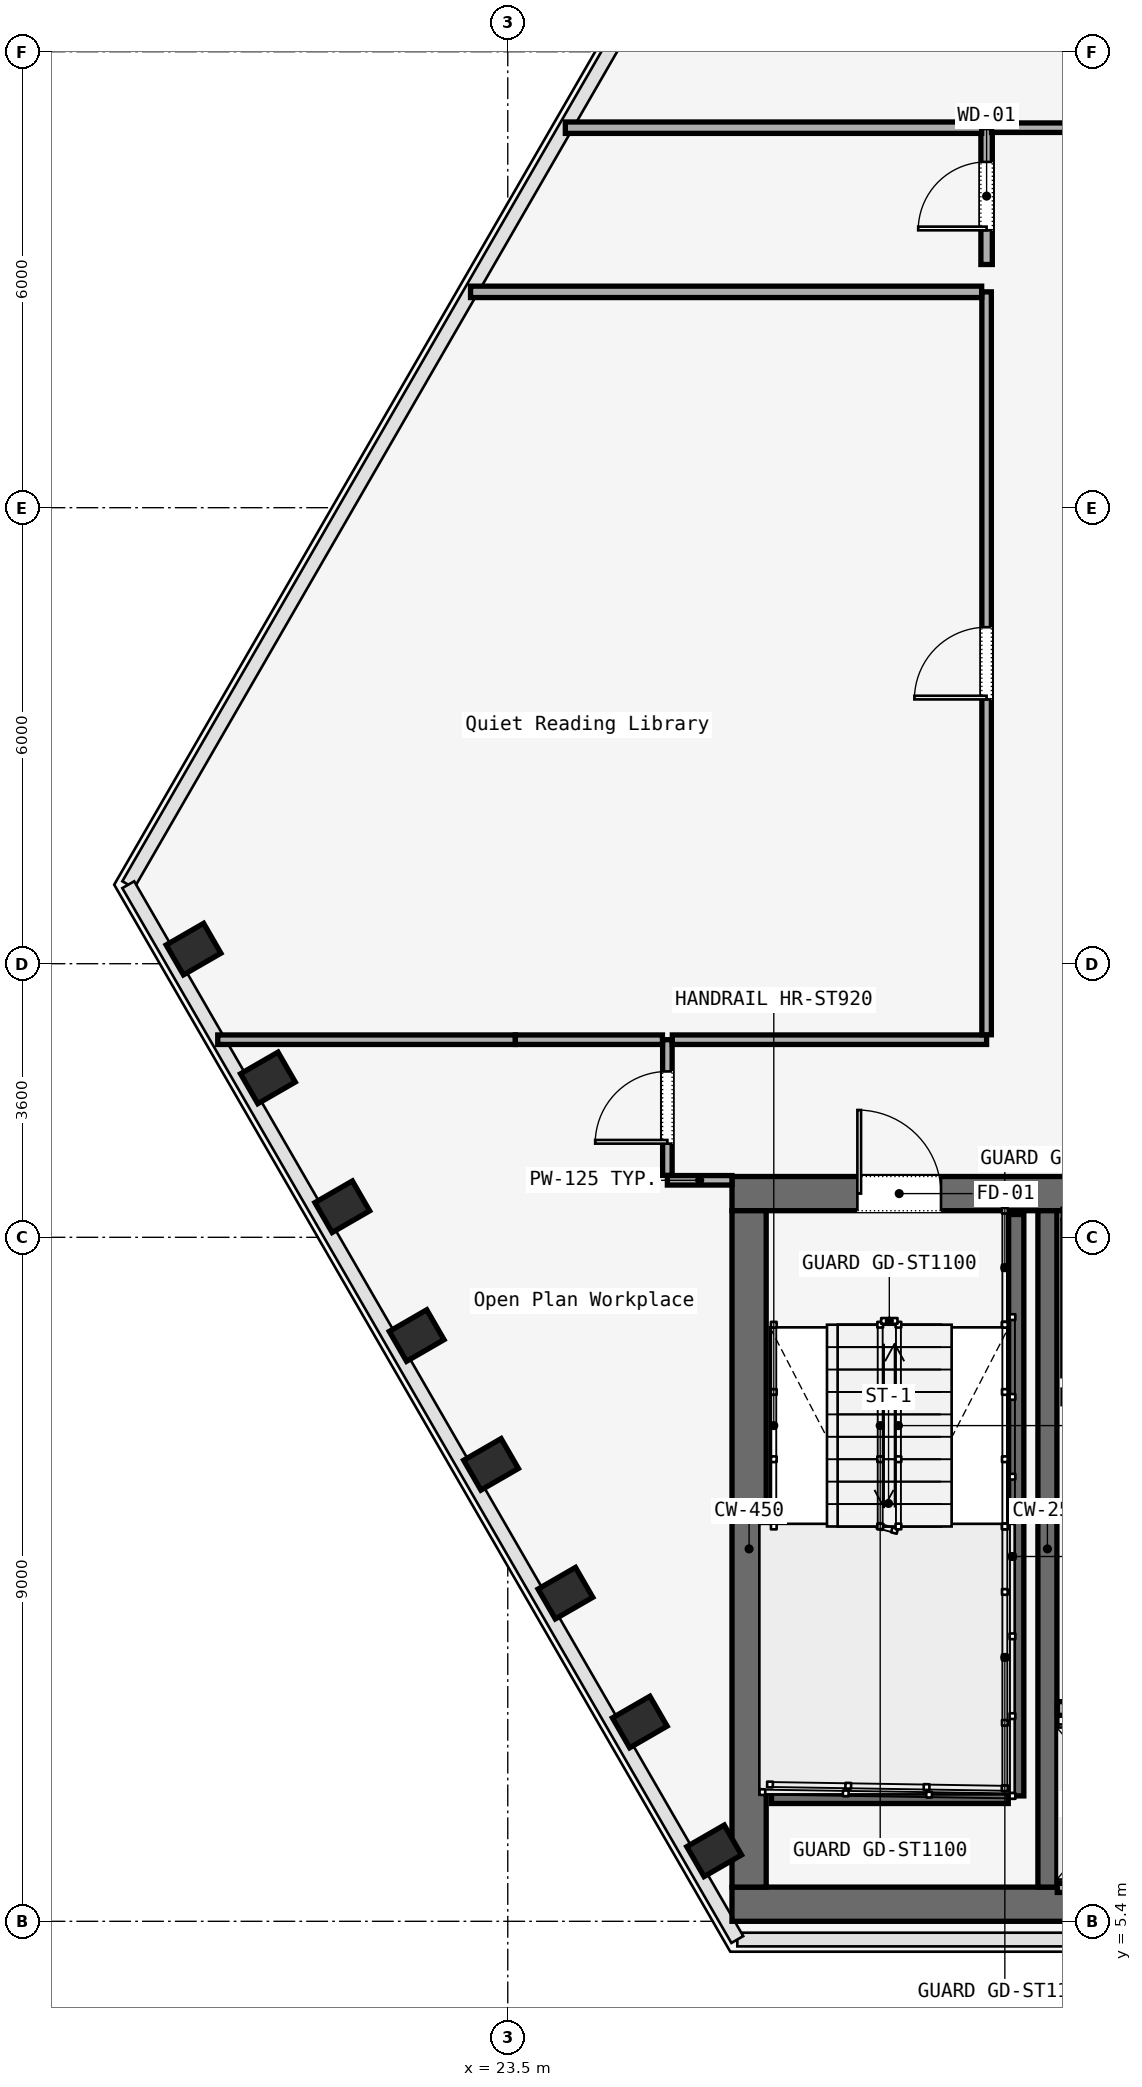
"""IFC4 building model, lengths in metres.
Left out: names, types, materials, properties, quantities, classifications, styles, units other than length and angle.
Written with IfcOpenShell. Run it as: python <this file> out.ifc"""

import sys

from ifc_helpers import new_model, si_unit, direction, frame, frame_2d, origin, origin_2d, place, context, subcontext, project, spatial, rectangle, i_section, extrude, element, fill, save


model = new_model("IFC4")
c1 = context("Model", 3, precision=1e-05, world=origin(), true_north=direction((0.0, 1.0)))
c2 = subcontext(c1, "Body", "Model", "MODEL_VIEW")
j1 = project(units=[si_unit("LENGTHUNIT", "METRE"), si_unit("PLANEANGLEUNIT", "RADIAN")], contexts=[c1])
p1 = place(None, origin())
s1 = spatial("IfcSite", under=j1, at=p1, CompositionType="ELEMENT")
p2 = place(p1, origin())
s2 = spatial("IfcBuilding", under=s1, at=p2, CompositionType="ELEMENT")
p3 = place(p2, frame((0.0, 0.0, 51.2)))
s3 = spatial("IfcBuildingStorey", under=s2, at=p3, CompositionType="ELEMENT", Elevation=51.2)
p4 = place(p3, frame((26.45, 14.975, 0.0), z_axis=(0.0, 0.0, 1.0), x_axis=(1.0, 0.0, 0.0)))
e1 = element("IfcWall", 1, at=p4, inside=s3, PredefinedType="SOLIDWALL", context=c2, shape_type="SweptSolid", body=[
    extrude(rectangle(XDim=31.1, YDim=0.45, at=frame_2d((15.55, 0.0))), origin(), (0.0, 0.0, 1.0), 3.58),
])
p5 = place(p4, frame((1.65, 0.0, 0.0)))
e2 = element("IfcOpeningElement", 2, at=p5, cuts=e1, PredefinedType="OPENING", context=c2, shape_type="SweptSolid", body=[
    extrude(rectangle(XDim=1.1, YDim=2.2, at=frame_2d((0.55, 1.1))), frame((0.0, 0.225, 0.0), z_axis=(0.0, -1.0, 0.0), x_axis=(1.0, 0.0, 0.0)), (0.0, 0.0, 1.0), 0.45),
])
p6 = place(p4, frame((13.65, 0.0, 0.0)))
e3 = element("IfcOpeningElement", 3, at=p6, cuts=e1, PredefinedType="OPENING", context=c2, shape_type="SweptSolid", body=[
    extrude(rectangle(XDim=1.1, YDim=2.2, at=frame_2d((0.55, 1.1))), frame((0.0, 0.225, 0.0), z_axis=(0.0, -1.0, 0.0), x_axis=(1.0, 0.0, 0.0)), (0.0, 0.0, 1.0), 0.45),
])
p7 = place(p4, frame((25.55, 0.0, 0.0)))
e4 = element("IfcOpeningElement", 4, at=p7, cuts=e1, PredefinedType="OPENING", context=c2, shape_type="SweptSolid", body=[
    extrude(rectangle(XDim=1.1, YDim=2.2, at=frame_2d((0.55, 1.1))), frame((0.0, 0.225, 0.0), z_axis=(0.0, -1.0, 0.0), x_axis=(1.0, 0.0, 0.0)), (0.0, 0.0, 1.0), 0.45),
])
p8 = place(p4, frame((10.7, 0.0, 0.0)))
e5 = element("IfcOpeningElement", 5, at=p8, cuts=e1, PredefinedType="OPENING", context=c2, shape_type="SweptSolid", body=[
    extrude(rectangle(XDim=1.4, YDim=2.2, at=frame_2d((0.7, 1.1))), frame((0.0, 0.225, 0.0), z_axis=(0.0, -1.0, 0.0), x_axis=(1.0, 0.0, 0.0)), (0.0, 0.0, 1.0), 0.45),
])
p9 = place(p4, frame((19.35, 0.0, 0.0)))
e6 = element("IfcOpeningElement", 6, at=p9, cuts=e1, PredefinedType="OPENING", context=c2, shape_type="SweptSolid", body=[
    extrude(rectangle(XDim=1.1, YDim=2.2, at=frame_2d((0.55, 1.1))), frame((0.0, 0.225, 0.0), z_axis=(0.0, -1.0, 0.0), x_axis=(1.0, 0.0, 0.0)), (0.0, 0.0, 1.0), 0.45),
])
p10 = place(p4, frame((21.4, 0.0, 0.0)))
e7 = element("IfcOpeningElement", 7, at=p10, cuts=e1, PredefinedType="OPENING", context=c2, shape_type="SweptSolid", body=[
    extrude(rectangle(XDim=0.9, YDim=2.1, at=frame_2d((0.45, 1.05))), frame((0.0, 0.225, 0.0), z_axis=(0.0, -1.0, 0.0), x_axis=(1.0, 0.0, 0.0)), (0.0, 0.0, 1.0), 0.45),
])
p11 = place(p4, frame((23.35, 0.0, 0.0)))
e8 = element("IfcOpeningElement", 8, at=p11, cuts=e1, PredefinedType="OPENING", context=c2, shape_type="SweptSolid", body=[
    extrude(rectangle(XDim=1.3, YDim=2.3, at=frame_2d((0.65, 1.15))), frame((0.0, 0.225, 0.0), z_axis=(0.0, -1.0, 0.0), x_axis=(1.0, 0.0, 0.0)), (0.0, 0.0, 1.0), 0.45),
])
p12 = place(p3, frame((26.45, 5.625, 0.0), z_axis=(0.0, 0.0, 1.0), x_axis=(1.0, 0.0, 0.0)))
e9 = element("IfcWall", 9, at=p12, inside=s3, PredefinedType="SOLIDWALL", context=c2, shape_type="SweptSolid", body=[
    extrude(rectangle(XDim=31.1, YDim=0.45, at=frame_2d((15.55, 0.0))), origin(), (0.0, 0.0, 1.0), 3.58),
])
p13 = place(p3, frame((26.675, 5.85, 0.0), z_axis=(0.0, 0.0, 1.0), x_axis=(0.0, 1.0, 0.0)))
e10 = element("IfcWall", 10, at=p13, inside=s3, PredefinedType="SOLIDWALL", context=c2, shape_type="SweptSolid", body=[
    extrude(rectangle(XDim=8.9, YDim=0.45, at=frame_2d((4.45, 0.0))), origin(), (0.0, 0.0, 1.0), 3.58),
])
p14 = place(p3, frame((30.6, 5.85, 0.0), z_axis=(0.0, 0.0, 1.0), x_axis=(0.0, 1.0, 0.0)))
e11 = element("IfcWall", 11, at=p14, inside=s3, PredefinedType="SOLIDWALL", context=c2, shape_type="SweptSolid", body=[
    extrude(rectangle(XDim=8.9, YDim=0.25, at=frame_2d((4.45, 0.0))), origin(), (0.0, 0.0, 1.0), 3.58),
])
for number, where, z_axis, x_axis in (
    (12, (19.365, 18.192, 0.0), (0.0, 0.0, 1.0), (-0.5, 0.866, 0.0)),
    (13, (20.344, 16.497, 0.0), (0.0, 0.0, 1.0), (-0.5, 0.866, 0.0)),
    (14, (21.323, 14.802, 0.0), (0.0, 0.0, 1.0), (-0.5, 0.866, 0.0)),
    (15, (22.301, 13.107, 0.0), (0.0, 0.0, 1.0), (-0.5, 0.866, 0.0)),
    (16, (23.28, 11.412, 0.0), (0.0, 0.0, 1.0), (-0.5, 0.866, 0.0)),
    (17, (24.258, 9.717, 0.0), (0.0, 0.0, 1.0), (-0.5, 0.866, 0.0)),
    (18, (25.237, 8.022, 0.0), (0.0, 0.0, 1.0), (-0.5, 0.866, 0.0)),
    (19, (26.216, 6.327, 0.0), (0.0, 0.0, 1.0), (-0.5, 0.866, 0.0)),
):
    element("IfcColumn", number, at=place(p3, frame(where, z_axis=z_axis, x_axis=x_axis)), inside=s3, PredefinedType="COLUMN", context=c2, shape_type="SweptSolid", body=[
        extrude(i_section(OverallWidth=0.454, OverallDepth=0.569, WebThickness=0.078, FlangeThickness=0.08, FilletRadius=0.015, at=origin_2d()), origin(), (0.0, 0.0, 1.0), 3.58),
    ])
p15 = place(p3, frame((30.19, 14.7, 0.0), z_axis=(0.0, 0.0, 1.0), x_axis=(0.0, -1.0, 0.0)))
e20 = element("IfcWall", 20, at=p15, inside=s3, PredefinedType="SOLIDWALL", context=c2, shape_type="SweptSolid", body=[
    extrude(rectangle(XDim=7.65, YDim=0.2, at=frame_2d((3.825, 0.0))), origin(), (0.0, 0.0, 1.0), 3.8),
])
p16 = place(p3, frame((26.97, 7.05, 0.0), z_axis=(0.0, 0.0, 1.0), x_axis=(1.0, 0.0, 0.0)))
e21 = element("IfcWall", 21, at=p16, inside=s3, PredefinedType="SOLIDWALL", context=c2, shape_type="SweptSolid", body=[
    extrude(rectangle(XDim=3.115, YDim=0.2, at=frame_2d((1.558, 0.0))), origin(), (0.0, 0.0, 1.0), 3.8),
])
p17 = place(p3, frame((30.73, 8.2, 0.0), z_axis=(0.0, 0.0, 1.0), x_axis=(1.0, 0.0, 0.0)))
e22 = element("IfcWall", 22, at=p17, inside=s3, PredefinedType="SOLIDWALL", context=c2, shape_type="SweptSolid", body=[
    extrude(rectangle(XDim=1.665, YDim=0.18, at=frame_2d((0.833, 0.0))), origin(), (0.0, 0.0, 1.0), 2.933),
])
p18 = place(p17, frame((0.282, 0.0, 0.0)))
e23 = element("IfcOpeningElement", 23, at=p18, cuts=e22, PredefinedType="OPENING", context=c2, shape_type="SweptSolid", body=[
    extrude(rectangle(XDim=1.1, YDim=2.2, at=frame_2d((0.55, 1.1))), frame((0.0, 0.09, 0.0), z_axis=(0.0, -1.0, 0.0), x_axis=(1.0, 0.0, 0.0)), (0.0, 0.0, 1.0), 0.18),
])
p19 = place(p3, frame((30.73, 5.84, 0.0), z_axis=(0.0, 0.0, 1.0), x_axis=(1.0, 0.0, 0.0)))
e24 = element("IfcWall", 24, at=p19, inside=s3, PredefinedType="SOLIDWALL", context=c2, shape_type="SweptSolid", body=[
    extrude(rectangle(XDim=1.665, YDim=0.12, at=frame_2d((0.833, 0.0))), origin(), (0.0, 0.0, 1.0), 2.933),
])
p20 = place(p3, frame((26.45, 15.15, 0.0), z_axis=(0.0, 0.0, 1.0), x_axis=(-1.0, 0.0, 0.0)))
e25 = element("IfcWall", 25, at=p20, inside=s3, PredefinedType="PARTITIONING", context=c2, shape_type="SweptSolid", body=[
    extrude(rectangle(XDim=0.85, YDim=0.125, at=frame_2d((0.425, 0.0))), origin(), (0.0, 0.0, 1.0), 2.933),
])
p21 = place(p3, frame((25.6, 15.215, 0.0), z_axis=(0.0, 0.0, 1.0), x_axis=(0.0, 1.0, 0.0)))
e26 = element("IfcWall", 26, at=p21, inside=s3, PredefinedType="PARTITIONING", context=c2, shape_type="SweptSolid", body=[
    extrude(rectangle(XDim=1.785, YDim=0.125, at=frame_2d((0.893, 0.0))), origin(), (0.0, 0.0, 1.0), 2.933),
])
p22 = place(p21, frame((0.417, 0.0, 0.0)))
e27 = element("IfcOpeningElement", 27, at=p22, cuts=e26, PredefinedType="OPENING", context=c2, shape_type="SweptSolid", body=[
    extrude(rectangle(XDim=0.95, YDim=2.2, at=frame_2d((0.475, 1.1))), frame((0.0, 0.062, 0.0), z_axis=(0.0, -1.0, 0.0), x_axis=(1.0, 0.0, 0.0)), (0.0, 0.0, 1.0), 0.125),
])
p23 = place(p3, frame((25.665, 17.0, 0.0), z_axis=(0.0, 0.0, 1.0), x_axis=(1.0, 0.0, 0.0)))
e28 = element("IfcWall", 28, at=p23, inside=s3, PredefinedType="PARTITIONING", context=c2, shape_type="SweptSolid", body=[
    extrude(rectangle(XDim=4.135, YDim=0.125, at=frame_2d((2.067, 0.0))), origin(), (0.0, 0.0, 1.0), 2.933),
])
p24 = place(p3, frame((29.8, 17.065, 0.0), z_axis=(0.0, 0.0, 1.0), x_axis=(0.0, 1.0, 0.0)))
e29 = element("IfcWall", 29, at=p24, inside=s3, PredefinedType="PARTITIONING", context=c2, shape_type="SweptSolid", body=[
    extrude(rectangle(XDim=9.775, YDim=0.125, at=frame_2d((4.888, 0.0))), origin(), (0.0, 0.0, 1.0), 2.933),
])
p25 = place(p24, frame((4.413, 0.0, 0.0)))
e30 = element("IfcOpeningElement", 30, at=p25, cuts=e29, PredefinedType="OPENING", context=c2, shape_type="SweptSolid", body=[
    extrude(rectangle(XDim=0.95, YDim=2.2, at=frame_2d((0.475, 1.1))), frame((0.0, 0.062, 0.0), z_axis=(0.0, -1.0, 0.0), x_axis=(1.0, 0.0, 0.0)), (0.0, 0.0, 1.0), 0.125),
])
p26 = place(p3, frame((29.8, 27.2, 0.0), z_axis=(0.0, 0.0, 1.0), x_axis=(0.0, 1.0, 0.0)))
e31 = element("IfcWall", 31, at=p26, inside=s3, PredefinedType="PARTITIONING", context=c2, shape_type="SweptSolid", body=[
    extrude(rectangle(XDim=1.8, YDim=0.15, at=frame_2d((0.9, 0.0))), origin(), (0.0, 0.0, 1.0), 2.933),
])
p27 = place(p26, frame((0.45, 0.0, 0.0)))
e32 = element("IfcOpeningElement", 32, at=p27, cuts=e31, PredefinedType="OPENING", context=c2, shape_type="SweptSolid", body=[
    extrude(rectangle(XDim=0.9, YDim=2.15, at=frame_2d((0.45, 1.075))), frame((0.0, 0.075, 0.0), z_axis=(0.0, -1.0, 0.0), x_axis=(1.0, 0.0, 0.0)), (0.0, 0.0, 1.0), 0.15),
])
p28 = place(p3, frame((29.865, 29.0, 0.0), z_axis=(0.0, 0.0, 1.0), x_axis=(1.0, 0.0, 0.0)))
e33 = element("IfcWall", 33, at=p28, inside=s3, PredefinedType="PARTITIONING", context=c2, shape_type="SweptSolid", body=[
    extrude(rectangle(XDim=1.735, YDim=0.125, at=frame_2d((0.868, 0.0))), origin(), (0.0, 0.0, 1.0), 2.933),
])
p29 = place(p3, frame((19.684, 17.0, 0.0), z_axis=(0.0, 0.0, 1.0), x_axis=(1.0, 0.0, 0.0)))
e34 = element("IfcWall", 34, at=p29, inside=s3, PredefinedType="PARTITIONING", context=c2, shape_type="SweptSolid", body=[
    extrude(rectangle(XDim=3.916, YDim=0.125, at=frame_2d((1.958, 0.0))), origin(), (0.0, 0.0, 1.0), 2.933),
])
p30 = place(p3, frame((23.6, 17.0, 0.0), z_axis=(0.0, 0.0, 1.0), x_axis=(1.0, 0.0, 0.0)))
e35 = element("IfcWall", 35, at=p30, inside=s3, PredefinedType="PARTITIONING", context=c2, shape_type="SweptSolid", body=[
    extrude(rectangle(XDim=1.935, YDim=0.125, at=frame_2d((0.967, 0.0))), origin(), (0.0, 0.0, 1.0), 2.933),
])
p31 = place(p3, frame((23.01, 26.84, 0.0), z_axis=(0.0, 0.0, 1.0), x_axis=(1.0, 0.0, 0.0)))
e36 = element("IfcWall", 36, at=p31, inside=s3, PredefinedType="PARTITIONING", context=c2, shape_type="SweptSolid", body=[
    extrude(rectangle(XDim=6.725, YDim=0.15, at=frame_2d((3.362, 0.0))), origin(), (0.0, 0.0, 1.0), 2.933),
])
p32 = place(p3, frame((24.258, 29.0, 0.0), z_axis=(0.0, 0.0, 1.0), x_axis=(1.0, 0.0, 0.0)))
e37 = element("IfcWall", 37, at=p32, inside=s3, PredefinedType="PARTITIONING", context=c2, shape_type="SweptSolid", body=[
    extrude(rectangle(XDim=5.478, YDim=0.15, at=frame_2d((2.739, 0.0))), origin(), (0.0, 0.0, 1.0), 2.933),
])
p33 = place(p5, origin())
e38 = element("IfcDoor", 38, at=p33, inside=s3, OperationType="SINGLE_SWING_LEFT", PredefinedType="DOOR", context=c2, shape_type="SweptSolid", body=[
    extrude(rectangle(XDim=1.1, YDim=2.2, at=frame_2d((0.55, 1.1))), frame((0.0, 0.025, 0.0), z_axis=(0.0, -1.0, 0.0), x_axis=(1.0, 0.0, 0.0)), (0.0, 0.0, 1.0), 0.05),
])
fill(e2, e38)
p34 = place(p22, origin())
e39 = element("IfcDoor", 39, at=p34, inside=s3, OperationType="SINGLE_SWING_LEFT", PredefinedType="DOOR", context=c2, shape_type="SweptSolid", body=[
    extrude(rectangle(XDim=0.95, YDim=2.2, at=frame_2d((0.475, 1.1))), frame((0.0, 0.025, 0.0), z_axis=(0.0, -1.0, 0.0), x_axis=(1.0, 0.0, 0.0)), (0.0, 0.0, 1.0), 0.05),
])
fill(e27, e39)
p35 = place(p25, origin())
e40 = element("IfcDoor", 40, at=p35, inside=s3, OperationType="SINGLE_SWING_LEFT", PredefinedType="DOOR", context=c2, shape_type="SweptSolid", body=[
    extrude(rectangle(XDim=0.95, YDim=2.2, at=frame_2d((0.475, 1.1))), frame((0.0, 0.025, 0.0), z_axis=(0.0, -1.0, 0.0), x_axis=(1.0, 0.0, 0.0)), (0.0, 0.0, 1.0), 0.05),
])
fill(e30, e40)
p36 = place(p27, origin())
e41 = element("IfcDoor", 41, at=p36, inside=s3, OperationType="SINGLE_SWING_RIGHT", PredefinedType="DOOR", context=c2, shape_type="SweptSolid", body=[
    extrude(rectangle(XDim=0.9, YDim=2.15, at=frame_2d((0.45, 1.075))), frame((0.0, 0.025, 0.0), z_axis=(0.0, -1.0, 0.0), x_axis=(1.0, 0.0, 0.0)), (0.0, 0.0, 1.0), 0.05),
])
fill(e32, e41)
save(model, sys.argv[1])
